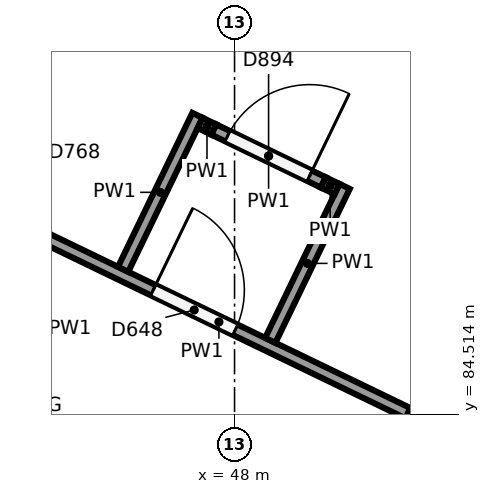
"""IFC4 building model, lengths in metres.
Left out: names, types, materials, properties, quantities, classifications, styles, units other than length and angle.
Written with IfcOpenShell. Run it as: python <this file> out.ifc"""

import sys

from ifc_helpers import new_model, si_unit, direction, frame, frame_2d, origin, place, context, subcontext, project, spatial, rectangle, extrude, element, fill, save


model = new_model("IFC4")
c1 = context("Model", 3, precision=1e-05, world=origin(), true_north=direction((0.0, 1.0)))
c2 = subcontext(c1, "Body", "Model", "MODEL_VIEW")
j1 = project(units=[si_unit("LENGTHUNIT", "METRE"), si_unit("PLANEANGLEUNIT", "RADIAN")], contexts=[c1])
p1 = place(None, origin())
s1 = spatial("IfcSite", under=j1, at=p1, CompositionType="ELEMENT")
p2 = place(p1, origin())
s2 = spatial("IfcBuilding", under=s1, at=p2, CompositionType="ELEMENT")
p3 = place(p2, frame((0.0, 0.0, 6.5)))
s3 = spatial("IfcBuildingStorey", under=s2, at=p3, CompositionType="ELEMENT", Elevation=6.5)
p4 = place(p3, frame((45.308, 86.931, 0.0), z_axis=(0.0, 0.0, 1.0), x_axis=(0.90052298219, -0.434808415911, 0.0)))
e1 = element("IfcWall", 1, at=p4, inside=s3, PredefinedType="PARTITIONING", context=c2, shape_type="SweptSolid", body=[
    extrude(rectangle(XDim=5.522, YDim=0.15, at=frame_2d((2.761, 0.0))), origin(), (0.0, 0.0, 1.0), 5.15),
])
p5 = place(p4, frame((1.8, 0.0, 0.0)))
e2 = element("IfcOpeningElement", 2, at=p5, cuts=e1, PredefinedType="OPENING", context=c2, shape_type="SweptSolid", body=[
    extrude(rectangle(XDim=1.2, YDim=2.1, at=frame_2d((0.6, 1.05))), frame((0.0, 0.085, 0.0), z_axis=(0.0, -1.0, 0.0), x_axis=(1.0, 0.0, 0.0)), (0.0, 0.0, 1.0), 0.17),
])
for number, where, z_axis, x_axis in (
    (3, (46.534, 86.423, 0.0), (0.0, 0.0, 1.0), (0.435, 0.901, 0.0)),
    (4, (48.47, 85.488, 0.0), (0.0, 0.0, 1.0), (0.435, 0.901, 0.0)),
):
    element("IfcWall", number, at=place(p3, frame(where, z_axis=z_axis, x_axis=x_axis)), inside=s3, PredefinedType="PARTITIONING", context=c2, shape_type="SweptSolid", body=[
        extrude(rectangle(XDim=2.25, YDim=0.15, at=frame_2d((1.125, 0.0))), origin(), (0.0, 0.0, 1.0), 5.15),
    ])
p6 = place(p3, frame((47.547, 88.349, 0.0), z_axis=(0.0, 0.0, 1.0), x_axis=(0.900205528442, -0.435465275954, 0.0)))
e5 = element("IfcWall", 5, at=p6, inside=s3, PredefinedType="PARTITIONING", context=c2, shape_type="SweptSolid", body=[
    extrude(rectangle(XDim=0.2, YDim=0.15, at=frame_2d((0.1, 0.0))), origin(), (0.0, 0.0, 1.0), 5.15),
])
p7 = place(p3, frame((47.728, 88.262, 0.0), z_axis=(0.0, 0.0, 1.0), x_axis=(0.90053721394, -0.434778939589, 0.0)))
e6 = element("IfcWall", 6, at=p7, inside=s3, PredefinedType="PARTITIONING", context=c2, shape_type="SweptSolid", body=[
    extrude(rectangle(XDim=1.6, YDim=0.15, at=frame_2d((0.8, 0.0))), origin(), (0.0, 0.0, 1.0), 5.15),
])
p8 = place(p7, frame((0.2, 0.0, 0.0)))
e7 = element("IfcOpeningElement", 7, at=p8, cuts=e6, PredefinedType="OPENING", context=c2, shape_type="SweptSolid", body=[
    extrude(rectangle(XDim=1.2, YDim=2.1, at=frame_2d((0.6, 1.05))), frame((0.0, 0.085, 0.0), z_axis=(0.0, -1.0, 0.0), x_axis=(1.0, 0.0, 0.0)), (0.0, 0.0, 1.0), 0.17),
])
p9 = place(p3, frame((49.168, 87.566, 0.0), z_axis=(0.0, 0.0, 1.0), x_axis=(0.900205528442, -0.435465275954, 0.0)))
e8 = element("IfcWall", 8, at=p9, inside=s3, PredefinedType="PARTITIONING", context=c2, shape_type="SweptSolid", body=[
    extrude(rectangle(XDim=0.2, YDim=0.15, at=frame_2d((0.1, 0.0))), origin(), (0.0, 0.0, 1.0), 5.15),
])
p10 = place(p5, origin())
e9 = element("IfcDoor", 9, at=p10, inside=s3, OperationType="SINGLE_SWING_LEFT", PredefinedType="DOOR", context=c2, shape_type="SweptSolid", body=[
    extrude(rectangle(XDim=1.2, YDim=2.1, at=frame_2d((0.6, 1.05))), frame((0.0, 0.025, 0.0), z_axis=(0.0, -1.0, 0.0), x_axis=(1.0, 0.0, 0.0)), (0.0, 0.0, 1.0), 0.05),
])
fill(e2, e9)
p11 = place(p8, origin())
e10 = element("IfcDoor", 10, at=p11, inside=s3, OperationType="SINGLE_SWING_RIGHT", PredefinedType="DOOR", context=c2, shape_type="SweptSolid", body=[
    extrude(rectangle(XDim=1.2, YDim=2.1, at=frame_2d((0.6, 1.05))), frame((0.0, 0.025, 0.0), z_axis=(0.0, -1.0, 0.0), x_axis=(1.0, 0.0, 0.0)), (0.0, 0.0, 1.0), 0.05),
])
fill(e7, e10)
save(model, sys.argv[1])
